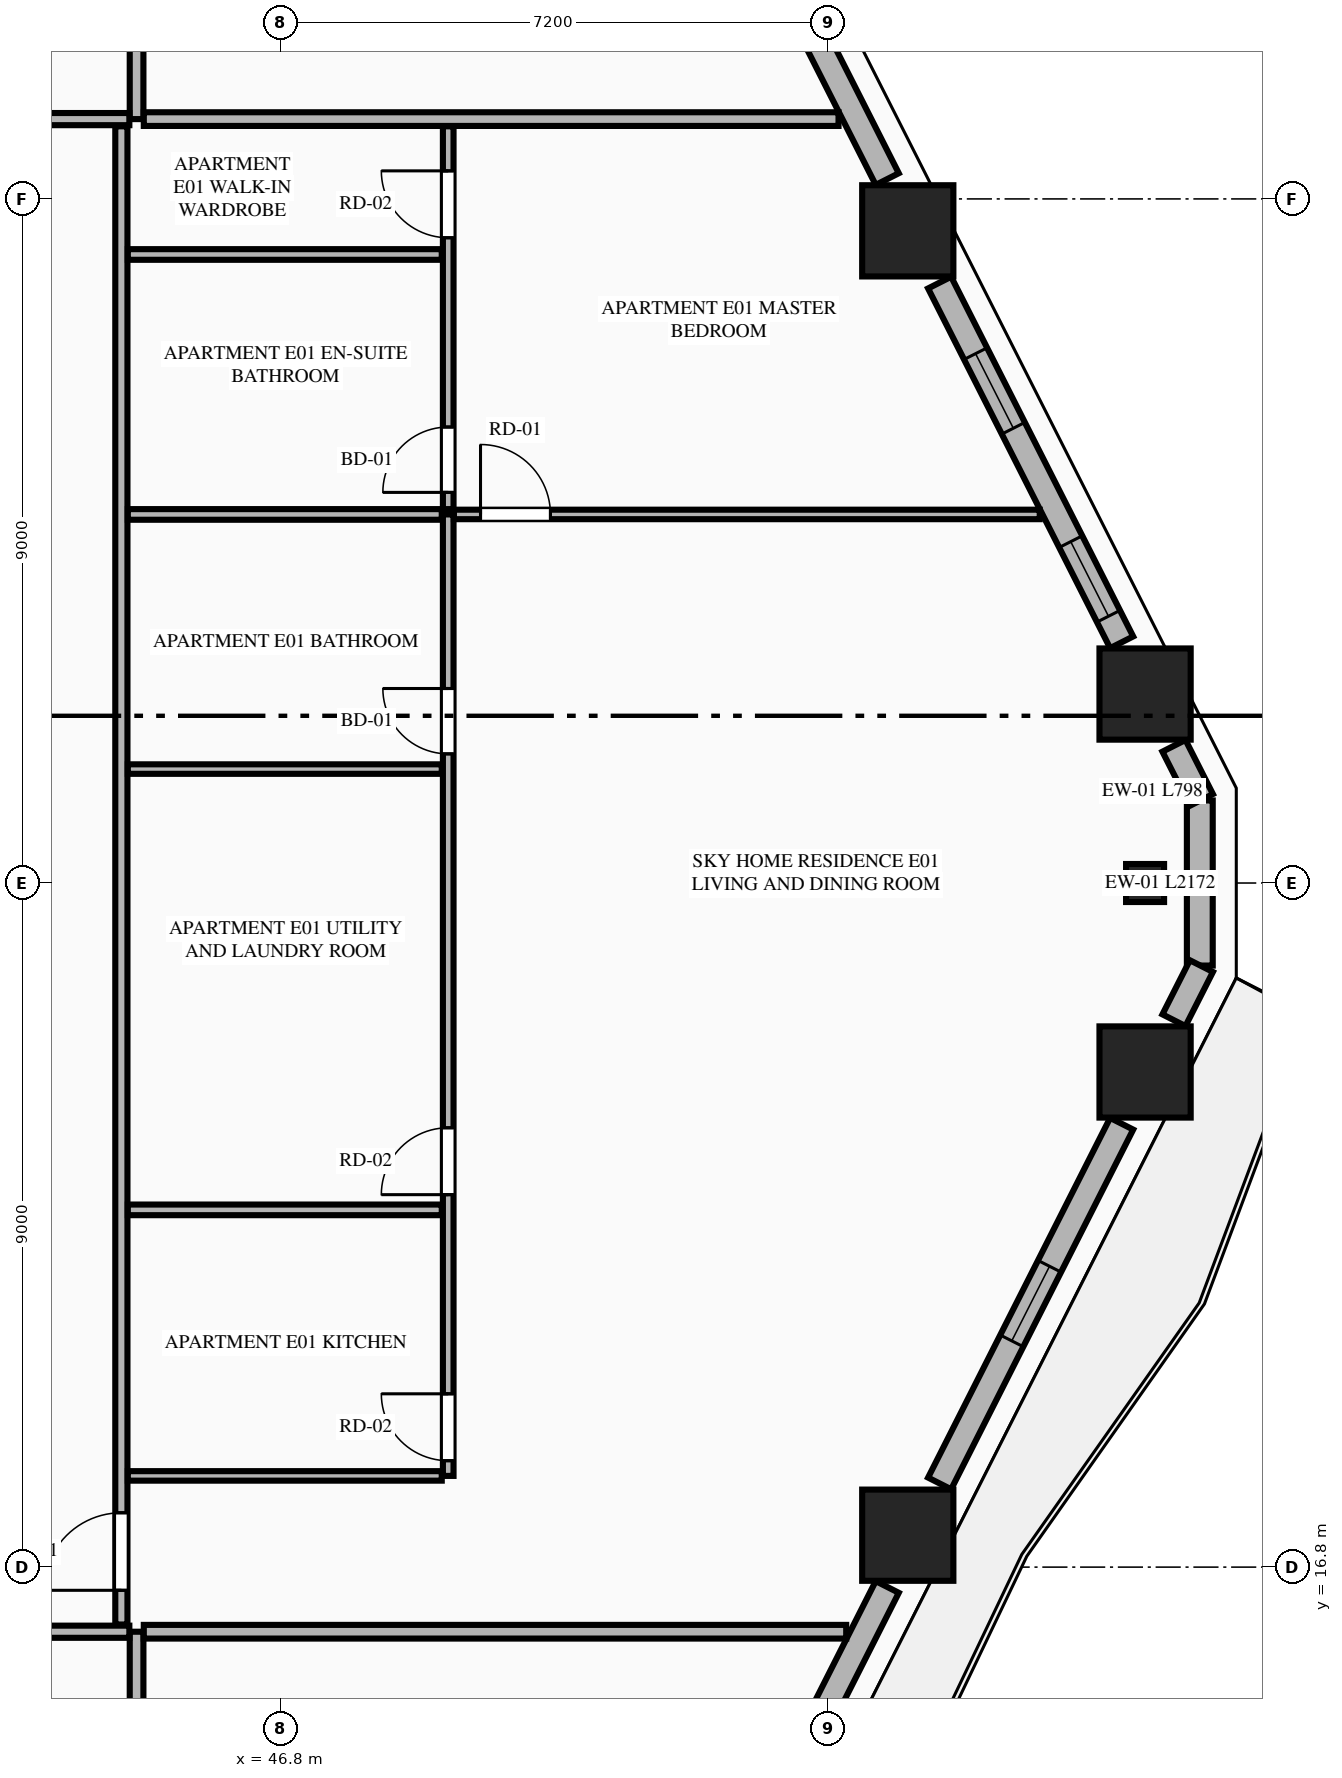
"""IFC4 building model, lengths in metres.
Left out: names, types, materials, properties, quantities, classifications, styles, units other than length and angle.
Written with IfcOpenShell. Run it as: python <this file> out.ifc"""

import sys

from ifc_helpers import new_model, si_unit, direction, frame, frame_2d, origin, origin_2d, place, context, subcontext, project, spatial, rectangle, extrude, element, fill, save


model = new_model("IFC4")
c1 = context("Model", 3, precision=1e-05, world=origin(), true_north=direction((0.0, 1.0)))
c2 = subcontext(c1, "Body", "Model", "MODEL_VIEW")
j1 = project(units=[si_unit("LENGTHUNIT", "METRE"), si_unit("PLANEANGLEUNIT", "RADIAN")], contexts=[c1])
p1 = place(None, origin())
s1 = spatial("IfcSite", under=j1, at=p1, CompositionType="ELEMENT")
p2 = place(p1, origin())
s2 = spatial("IfcBuilding", under=s1, at=p2, CompositionType="ELEMENT")
p3 = place(p2, frame((0.0, 0.0, 28.45)))
s3 = spatial("IfcBuildingStorey", under=s2, at=p3, CompositionType="ELEMENT", Elevation=28.45)
for number, where, z_axis, x_axis in (
    (1, (55.046, 17.22, 0.0), (0.0, 0.0, 1.0), (1.0, 0.0, 0.0)),
    (2, (58.168, 23.314, 0.0), (0.0, 0.0, 1.0), (1.0, 0.0, 0.0)),
    (3, (58.168, 28.286, 0.0), (0.0, 0.0, 1.0), (1.0, 0.0, 0.0)),
    (4, (55.046, 34.38, 0.0), (0.0, 0.0, 1.0), (1.0, 0.0, 0.0)),
):
    element("IfcColumn", number, at=place(p3, frame(where, z_axis=z_axis, x_axis=x_axis)), inside=s3, PredefinedType="COLUMN", context=c2, shape_type="SweptSolid", body=[
        extrude(rectangle(XDim=1.2, YDim=1.2, at=origin_2d()), origin(), (0.0, 0.0, 1.0), 3.55),
    ])
p4 = place(p3, frame((58.168, 25.8, 0.0), z_axis=(0.0, 0.0, 1.0), x_axis=(0.0, 1.0, 0.0)))
e5 = element("IfcColumn", 5, at=p4, inside=s3, PredefinedType="PILASTER", context=c2, shape_type="SweptSolid", body=[
    extrude(rectangle(XDim=0.5, YDim=0.35, at=origin_2d()), origin(), (0.0, 0.0, 1.0), 3.55),
])
p5 = place(p3, frame((58.888, 24.714, 0.0), z_axis=(0.0, 0.0, 1.0), x_axis=(0.0, 1.0, 0.0)))
e6 = element("IfcWall", 6, at=p5, inside=s3, PredefinedType="STANDARD", context=c2, shape_type="SweptSolid", body=[
    extrude(rectangle(XDim=2.172, YDim=0.34, at=frame_2d((1.086, 0.0))), origin(), (0.0, 0.0, 1.0), 3.33),
])
p6 = place(p3, frame((52.271, 11.59, 0.0), z_axis=(0.0, 0.0, 1.0), x_axis=(0.451592100298, 0.892224509273, 0.0)))
e7 = element("IfcWall", 7, at=p6, inside=s3, PredefinedType="STANDARD", context=c2, shape_type="SweptSolid", body=[
    extrude(rectangle(XDim=5.547, YDim=0.34, at=frame_2d((2.773, 0.0))), origin(), (0.0, 0.0, 1.0), 2.787),
])
p7 = place(p6, frame((1.768, 0.0, 0.0)))
e8 = element("IfcOpeningElement", 8, at=p7, cuts=e7, PredefinedType="OPENING", context=c2, shape_type="SweptSolid", body=[
    extrude(rectangle(XDim=1.1, YDim=2.25, at=frame_2d((0.55, 1.125))), frame((0.0, 0.18, 0.0), z_axis=(0.0, -1.0, 0.0), x_axis=(1.0, 0.0, 0.0)), (0.0, 0.0, 1.0), 0.36),
])
p8 = place(p3, frame((55.465, 17.901, 0.0), z_axis=(0.0, 0.0, 1.0), x_axis=(0.451572088722, 0.892234637686, 0.0)))
e9 = element("IfcWall", 9, at=p8, inside=s3, PredefinedType="STANDARD", context=c2, shape_type="SweptSolid", body=[
    extrude(rectangle(XDim=5.304, YDim=0.34, at=frame_2d((2.652, 0.0))), origin(), (0.0, 0.0, 1.0), 2.787),
])
p9 = place(p8, frame((2.102, 0.0, 0.75)))
e10 = element("IfcOpeningElement", 10, at=p9, cuts=e9, PredefinedType="OPENING", context=c2, shape_type="SweptSolid", body=[
    extrude(rectangle(XDim=1.1, YDim=1.887, at=frame_2d((0.55, 0.943))), frame((0.0, 0.18, 0.0), z_axis=(0.0, -1.0, 0.0), x_axis=(1.0, 0.0, 0.0)), (0.0, 0.0, 1.0), 0.36),
])
for number, where, z_axis, x_axis in (
    (11, (58.548, 23.995, 0.0), (0.0, 0.0, 1.0), (0.452, 0.892, 0.0)),
    (12, (58.909, 26.893, 0.0), (0.0, 0.0, 1.0), (-0.452, 0.892, 0.0)),
):
    element("IfcWall", number, at=place(p3, frame(where, z_axis=z_axis, x_axis=x_axis)), inside=s3, PredefinedType="STANDARD", context=c2, shape_type="SweptSolid", body=[
        extrude(rectangle(XDim=0.798, YDim=0.34, at=frame_2d((0.399, 0.0))), origin(), (0.0, 0.0, 1.0), 3.33),
    ])
p10 = place(p3, frame((57.86, 28.967, 0.0), z_axis=(0.0, 0.0, 1.0), x_axis=(-0.451590635984, 0.892225250422, 0.0)))
e13 = element("IfcWall", 13, at=p10, inside=s3, PredefinedType="STANDARD", context=c2, shape_type="SweptSolid", body=[
    extrude(rectangle(XDim=5.303, YDim=0.34, at=frame_2d((2.652, 0.0))), origin(), (0.0, 0.0, 1.0), 2.787),
])
p11 = place(p10, frame((0.384, 0.0, 0.75)))
e14 = element("IfcOpeningElement", 14, at=p11, cuts=e13, PredefinedType="OPENING", context=c2, shape_type="SweptSolid", body=[
    extrude(rectangle(XDim=1.1, YDim=1.887, at=frame_2d((0.55, 0.943))), frame((0.0, 0.18, 0.0), z_axis=(0.0, -1.0, 0.0), x_axis=(1.0, 0.0, 0.0)), (0.0, 0.0, 1.0), 0.36),
])
p12 = place(p10, frame((3.156, 0.0, 0.75)))
e15 = element("IfcOpeningElement", 15, at=p12, cuts=e13, PredefinedType="OPENING", context=c2, shape_type="SweptSolid", body=[
    extrude(rectangle(XDim=1.1, YDim=1.887, at=frame_2d((0.55, 0.943))), frame((0.0, 0.18, 0.0), z_axis=(0.0, -1.0, 0.0), x_axis=(1.0, 0.0, 0.0)), (0.0, 0.0, 1.0), 0.36),
])
p13 = place(p3, frame((54.776, 35.061, 0.0), z_axis=(0.0, 0.0, 1.0), x_axis=(-0.451592100298, 0.892224509273, 0.0)))
e16 = element("IfcWall", 16, at=p13, inside=s3, PredefinedType="STANDARD", context=c2, shape_type="SweptSolid", body=[
    extrude(rectangle(XDim=5.547, YDim=0.34, at=frame_2d((2.773, 0.0))), origin(), (0.0, 0.0, 1.0), 2.787),
])
p14 = place(p13, frame((2.223, 0.0, 0.75)))
e17 = element("IfcOpeningElement", 17, at=p14, cuts=e16, PredefinedType="OPENING", context=c2, shape_type="SweptSolid", body=[
    extrude(rectangle(XDim=1.1, YDim=1.887, at=frame_2d((0.55, 0.943))), frame((0.0, 0.18, 0.0), z_axis=(0.0, -1.0, 0.0), x_axis=(1.0, 0.0, 0.0)), (0.0, 0.0, 1.0), 0.36),
])
p15 = place(p3, frame((44.9, 2.455, 0.0), z_axis=(0.0, 0.0, 1.0), x_axis=(0.0, 1.0, 0.0)))
e18 = element("IfcWall", 18, at=p15, inside=s3, PredefinedType="PARTITIONING", context=c2, shape_type="SweptSolid", body=[
    extrude(rectangle(XDim=13.495, YDim=0.18, at=frame_2d((6.748, 0.0))), origin(), (0.0, 0.0, 1.0), 3.33),
])
p16 = place(p3, frame((28.373, 15.95, 0.0), z_axis=(0.0, 0.0, 1.0), x_axis=(1.0, 0.0, 0.0)))
e19 = element("IfcWall", 19, at=p16, inside=s3, PredefinedType="PARTITIONING", context=c2, shape_type="SweptSolid", body=[
    extrude(rectangle(XDim=16.432, YDim=0.16, at=frame_2d((8.216, 0.0))), origin(), (0.0, 0.0, 1.0), 3.33),
])
p17 = place(p16, frame((0.355, 0.0, 0.0)))
e20 = element("IfcOpeningElement", 20, at=p17, cuts=e19, PredefinedType="OPENING", context=c2, shape_type="SweptSolid", body=[
    extrude(rectangle(XDim=1.35, YDim=2.35, at=frame_2d((0.675, 1.175))), frame((0.0, 0.09, 0.0), z_axis=(0.0, -1.0, 0.0), x_axis=(1.0, 0.0, 0.0)), (0.0, 0.0, 1.0), 0.18),
])
p18 = place(p3, frame((44.9, 35.85, 0.0), z_axis=(0.0, 0.0, 1.0), x_axis=(0.0, 1.0, 0.0)))
e21 = element("IfcWall", 21, at=p18, inside=s3, PredefinedType="PARTITIONING", context=c2, shape_type="SweptSolid", body=[
    extrude(rectangle(XDim=13.295, YDim=0.18, at=frame_2d((6.647, 0.0))), origin(), (0.0, 0.0, 1.0), 3.33),
])
p19 = place(p3, frame((36.617, 35.85, 0.0), z_axis=(0.0, 0.0, 1.0), x_axis=(1.0, 0.0, 0.0)))
e22 = element("IfcWall", 22, at=p19, inside=s3, PredefinedType="PARTITIONING", context=c2, shape_type="SweptSolid", body=[
    extrude(rectangle(XDim=8.188, YDim=0.16, at=frame_2d((4.094, 0.0))), origin(), (0.0, 0.0, 1.0), 3.33),
])
p20 = place(p19, frame((0.355, 0.0, 0.0)))
e23 = element("IfcOpeningElement", 23, at=p20, cuts=e22, PredefinedType="OPENING", context=c2, shape_type="SweptSolid", body=[
    extrude(rectangle(XDim=1.02, YDim=2.25, at=frame_2d((0.51, 1.125))), frame((0.0, 0.09, 0.0), z_axis=(0.0, -1.0, 0.0), x_axis=(1.0, 0.0, 0.0)), (0.0, 0.0, 1.0), 0.18),
])
p21 = place(p3, frame((44.995, 15.95, 0.0), z_axis=(0.0, 0.0, 1.0), x_axis=(1.0, 0.0, 0.0)))
e24 = element("IfcWall", 24, at=p21, inside=s3, PredefinedType="PARTITIONING", context=c2, shape_type="SweptSolid", body=[
    extrude(rectangle(XDim=9.241, YDim=0.18, at=frame_2d((4.621, 0.0))), origin(), (0.0, 0.0, 1.0), 3.33),
])
p22 = place(p3, frame((44.995, 35.85, 0.0), z_axis=(0.0, 0.0, 1.0), x_axis=(1.0, 0.0, 0.0)))
e25 = element("IfcWall", 25, at=p22, inside=s3, PredefinedType="PARTITIONING", context=c2, shape_type="SweptSolid", body=[
    extrude(rectangle(XDim=9.14, YDim=0.18, at=frame_2d((4.57, 0.0))), origin(), (0.0, 0.0, 1.0), 3.33),
])
p23 = place(p3, frame((44.7, 16.045, 0.0), z_axis=(0.0, 0.0, 1.0), x_axis=(0.0, 1.0, 0.0)))
e26 = element("IfcWall", 26, at=p23, inside=s3, PredefinedType="PARTITIONING", context=c2, shape_type="SweptSolid", body=[
    extrude(rectangle(XDim=19.71, YDim=0.16, at=frame_2d((9.855, 0.0))), origin(), (0.0, 0.0, 1.0), 2.7),
])
p24 = place(p23, frame((0.45, 0.0, 0.0)))
e27 = element("IfcOpeningElement", 27, at=p24, cuts=e26, PredefinedType="OPENING", context=c2, shape_type="SweptSolid", body=[
    extrude(rectangle(XDim=1.02, YDim=2.25, at=frame_2d((0.51, 1.125))), frame((0.0, 0.09, 0.0), z_axis=(0.0, -1.0, 0.0), x_axis=(1.0, 0.0, 0.0)), (0.0, 0.0, 1.0), 0.18),
])
p25 = place(p3, frame((44.785, 18.0, 0.0), z_axis=(0.0, 0.0, 1.0), x_axis=(1.0, 0.0, 0.0)))
e28 = element("IfcWall", 28, at=p25, inside=s3, PredefinedType="PARTITIONING", context=c2, shape_type="SweptSolid", body=[
    extrude(rectangle(XDim=4.13, YDim=0.125, at=frame_2d((2.065, 0.0))), origin(), (0.0, 0.0, 1.0), 2.7),
])
p26 = place(p3, frame((49.0, 18.0, 0.0), z_axis=(0.0, 0.0, 1.0), x_axis=(0.0, 1.0, 0.0)))
e29 = element("IfcWall", 29, at=p26, inside=s3, PredefinedType="PLUMBINGWALL", context=c2, shape_type="SweptSolid", body=[
    extrude(rectangle(XDim=12.649, YDim=0.14, at=frame_2d((6.324, 0.0))), origin(), (0.0, 0.0, 1.0), 3.33),
])
p27 = place(p26, frame((0.2, 0.0, 0.0)))
e30 = element("IfcOpeningElement", 30, at=p27, cuts=e29, PredefinedType="OPENING", context=c2, shape_type="SweptSolid", body=[
    extrude(rectangle(XDim=0.88, YDim=2.15, at=frame_2d((0.44, 1.075))), frame((0.0, 0.08, 0.0), z_axis=(0.0, -1.0, 0.0), x_axis=(1.0, 0.0, 0.0)), (0.0, 0.0, 1.0), 0.16),
])
p28 = place(p26, frame((3.7, 0.0, 0.0)))
e31 = element("IfcOpeningElement", 31, at=p28, cuts=e29, PredefinedType="OPENING", context=c2, shape_type="SweptSolid", body=[
    extrude(rectangle(XDim=0.88, YDim=2.15, at=frame_2d((0.44, 1.075))), frame((0.0, 0.08, 0.0), z_axis=(0.0, -1.0, 0.0), x_axis=(1.0, 0.0, 0.0)), (0.0, 0.0, 1.0), 0.16),
])
p29 = place(p26, frame((9.499, 0.0, 0.0)))
e32 = element("IfcOpeningElement", 32, at=p29, cuts=e29, PredefinedType="OPENING", context=c2, shape_type="SweptSolid", body=[
    extrude(rectangle(XDim=0.86, YDim=2.1, at=frame_2d((0.43, 1.05))), frame((0.0, 0.08, 0.0), z_axis=(0.0, -1.0, 0.0), x_axis=(1.0, 0.0, 0.0)), (0.0, 0.0, 1.0), 0.16),
])
p30 = place(p3, frame((49.0, 30.719, 0.0), z_axis=(0.0, 0.0, 1.0), x_axis=(0.0, 1.0, 0.0)))
e33 = element("IfcWall", 33, at=p30, inside=s3, PredefinedType="PLUMBINGWALL", context=c2, shape_type="SweptSolid", body=[
    extrude(rectangle(XDim=5.036, YDim=0.14, at=frame_2d((2.518, 0.0))), origin(), (0.0, 0.0, 1.0), 3.33),
])
p31 = place(p30, frame((0.22, 0.0, 0.0)))
e34 = element("IfcOpeningElement", 34, at=p31, cuts=e33, PredefinedType="OPENING", context=c2, shape_type="SweptSolid", body=[
    extrude(rectangle(XDim=0.86, YDim=2.1, at=frame_2d((0.43, 1.05))), frame((0.0, 0.08, 0.0), z_axis=(0.0, -1.0, 0.0), x_axis=(1.0, 0.0, 0.0)), (0.0, 0.0, 1.0), 0.16),
])
p32 = place(p30, frame((3.57, 0.0, 0.0)))
e35 = element("IfcOpeningElement", 35, at=p32, cuts=e33, PredefinedType="OPENING", context=c2, shape_type="SweptSolid", body=[
    extrude(rectangle(XDim=0.88, YDim=2.15, at=frame_2d((0.44, 1.075))), frame((0.0, 0.08, 0.0), z_axis=(0.0, -1.0, 0.0), x_axis=(1.0, 0.0, 0.0)), (0.0, 0.0, 1.0), 0.16),
])
p33 = place(p3, frame((44.785, 30.649, 0.0), z_axis=(0.0, 0.0, 1.0), x_axis=(1.0, 0.0, 0.0)))
e36 = element("IfcWall", 36, at=p33, inside=s3, PredefinedType="PLUMBINGWALL", context=c2, shape_type="SweptSolid", body=[
    extrude(rectangle(XDim=4.13, YDim=0.14, at=frame_2d((2.065, 0.0))), origin(), (0.0, 0.0, 1.0), 3.33),
])
p34 = place(p3, frame((49.075, 30.649, 0.0), z_axis=(0.0, 0.0, 1.0), x_axis=(1.0, 0.0, 0.0)))
e37 = element("IfcWall", 37, at=p34, inside=s3, PredefinedType="PARTITIONING", context=c2, shape_type="SweptSolid", body=[
    extrude(rectangle(XDim=7.707, YDim=0.125, at=frame_2d((3.854, 0.0))), origin(), (0.0, 0.0, 1.0), 3.33),
])
p35 = place(p34, frame((0.35, 0.0, 0.0)))
e38 = element("IfcOpeningElement", 38, at=p35, cuts=e37, PredefinedType="OPENING", context=c2, shape_type="SweptSolid", body=[
    extrude(rectangle(XDim=0.92, YDim=2.15, at=frame_2d((0.46, 1.075))), frame((0.0, 0.073, 0.0), z_axis=(0.0, -1.0, 0.0), x_axis=(1.0, 0.0, 0.0)), (0.0, 0.0, 1.0), 0.145),
])
p36 = place(p3, frame((44.785, 21.5, 0.0), z_axis=(0.0, 0.0, 1.0), x_axis=(1.0, 0.0, 0.0)))
e39 = element("IfcWall", 39, at=p36, inside=s3, PredefinedType="PLUMBINGWALL", context=c2, shape_type="SweptSolid", body=[
    extrude(rectangle(XDim=4.13, YDim=0.14, at=frame_2d((2.065, 0.0))), origin(), (0.0, 0.0, 1.0), 3.33),
])
p37 = place(p3, frame((44.785, 27.299, 0.0), z_axis=(0.0, 0.0, 1.0), x_axis=(1.0, 0.0, 0.0)))
e40 = element("IfcWall", 40, at=p37, inside=s3, PredefinedType="PARTITIONING", context=c2, shape_type="SweptSolid", body=[
    extrude(rectangle(XDim=4.13, YDim=0.125, at=frame_2d((2.065, 0.0))), origin(), (0.0, 0.0, 1.0), 3.33),
])
p38 = place(p3, frame((44.785, 34.069, 0.0), z_axis=(0.0, 0.0, 1.0), x_axis=(1.0, 0.0, 0.0)))
e41 = element("IfcWall", 41, at=p38, inside=s3, PredefinedType="PLUMBINGWALL", context=c2, shape_type="SweptSolid", body=[
    extrude(rectangle(XDim=4.13, YDim=0.14, at=frame_2d((2.065, 0.0))), origin(), (0.0, 0.0, 1.0), 2.7),
])
p39 = place(p9, origin())
e42 = element("IfcWindow", 42, at=p39, inside=s3, PartitioningType="SINGLE_PANEL", PredefinedType="WINDOW", context=c2, shape_type="SweptSolid", body=[
    extrude(rectangle(XDim=1.1, YDim=1.887, at=frame_2d((0.55, 0.943))), frame((0.0, 0.03, 0.0), z_axis=(0.0, -1.0, 0.0), x_axis=(1.0, 0.0, 0.0)), (0.0, 0.0, 1.0), 0.06),
])
fill(e10, e42)
p40 = place(p11, origin())
e43 = element("IfcWindow", 43, at=p40, inside=s3, PartitioningType="SINGLE_PANEL", PredefinedType="WINDOW", context=c2, shape_type="SweptSolid", body=[
    extrude(rectangle(XDim=1.1, YDim=1.887, at=frame_2d((0.55, 0.943))), frame((0.0, 0.03, 0.0), z_axis=(0.0, -1.0, 0.0), x_axis=(1.0, 0.0, 0.0)), (0.0, 0.0, 1.0), 0.06),
])
fill(e14, e43)
p41 = place(p27, origin())
e44 = element("IfcDoor", 44, at=p41, inside=s3, OperationType="SINGLE_SWING_RIGHT", PredefinedType="DOOR", context=c2, shape_type="SweptSolid", body=[
    extrude(rectangle(XDim=0.88, YDim=2.15, at=frame_2d((0.44, 1.075))), frame((0.0, 0.025, 0.0), z_axis=(0.0, -1.0, 0.0), x_axis=(1.0, 0.0, 0.0)), (0.0, 0.0, 1.0), 0.05),
])
fill(e30, e44)
p42 = place(p28, origin())
e45 = element("IfcDoor", 45, at=p42, inside=s3, OperationType="SINGLE_SWING_LEFT", PredefinedType="DOOR", context=c2, shape_type="SweptSolid", body=[
    extrude(rectangle(XDim=0.88, YDim=2.15, at=frame_2d((0.44, 1.075))), frame((0.0, 0.025, 0.0), z_axis=(0.0, -1.0, 0.0), x_axis=(1.0, 0.0, 0.0)), (0.0, 0.0, 1.0), 0.05),
])
fill(e31, e45)
p43 = place(p29, origin())
e46 = element("IfcDoor", 46, at=p43, inside=s3, OperationType="SINGLE_SWING_RIGHT", PredefinedType="DOOR", context=c2, shape_type="SweptSolid", body=[
    extrude(rectangle(XDim=0.86, YDim=2.1, at=frame_2d((0.43, 1.05))), frame((0.0, 0.025, 0.0), z_axis=(0.0, -1.0, 0.0), x_axis=(1.0, 0.0, 0.0)), (0.0, 0.0, 1.0), 0.05),
])
fill(e32, e46)
p44 = place(p31, origin())
e47 = element("IfcDoor", 47, at=p44, inside=s3, OperationType="SINGLE_SWING_LEFT", PredefinedType="DOOR", context=c2, shape_type="SweptSolid", body=[
    extrude(rectangle(XDim=0.86, YDim=2.1, at=frame_2d((0.43, 1.05))), frame((0.0, 0.025, 0.0), z_axis=(0.0, -1.0, 0.0), x_axis=(1.0, 0.0, 0.0)), (0.0, 0.0, 1.0), 0.05),
])
fill(e34, e47)
p45 = place(p32, origin())
e48 = element("IfcDoor", 48, at=p45, inside=s3, OperationType="SINGLE_SWING_RIGHT", PredefinedType="DOOR", context=c2, shape_type="SweptSolid", body=[
    extrude(rectangle(XDim=0.88, YDim=2.15, at=frame_2d((0.44, 1.075))), frame((0.0, 0.025, 0.0), z_axis=(0.0, -1.0, 0.0), x_axis=(1.0, 0.0, 0.0)), (0.0, 0.0, 1.0), 0.05),
])
fill(e35, e48)
p46 = place(p24, origin())
e49 = element("IfcDoor", 49, at=p46, inside=s3, OperationType="SINGLE_SWING_LEFT", PredefinedType="DOOR", context=c2, shape_type="SweptSolid", body=[
    extrude(rectangle(XDim=1.02, YDim=2.25, at=frame_2d((0.51, 1.125))), frame((0.0, 0.025, 0.0), z_axis=(0.0, -1.0, 0.0), x_axis=(1.0, 0.0, 0.0)), (0.0, 0.0, 1.0), 0.05),
])
fill(e27, e49)
p47 = place(p35, origin())
e50 = element("IfcDoor", 50, at=p47, inside=s3, OperationType="SINGLE_SWING_LEFT", PredefinedType="DOOR", context=c2, shape_type="SweptSolid", body=[
    extrude(rectangle(XDim=0.92, YDim=2.15, at=frame_2d((0.46, 1.075))), frame((0.0, 0.025, 0.0), z_axis=(0.0, -1.0, 0.0), x_axis=(1.0, 0.0, 0.0)), (0.0, 0.0, 1.0), 0.05),
])
fill(e38, e50)
p48 = place(p12, origin())
e51 = element("IfcWindow", 51, at=p48, inside=s3, PartitioningType="SINGLE_PANEL", PredefinedType="WINDOW", context=c2, shape_type="SweptSolid", body=[
    extrude(rectangle(XDim=1.1, YDim=1.887, at=frame_2d((0.55, 0.943))), frame((0.0, 0.03, 0.0), z_axis=(0.0, -1.0, 0.0), x_axis=(1.0, 0.0, 0.0)), (0.0, 0.0, 1.0), 0.06),
])
fill(e15, e51)
save(model, sys.argv[1])
